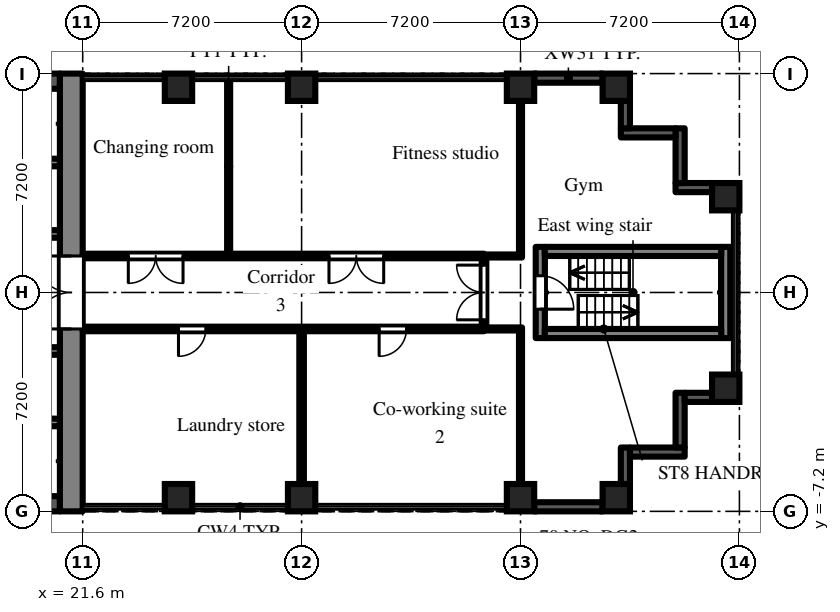
"""IFC4 building model, lengths in metres.
Left out: names, types, materials, properties, quantities, classifications, styles, units other than length and angle.
Written with IfcOpenShell. Run it as: python <this file> out.ifc"""

import sys

from ifc_helpers import new_model, si_unit, direction, frame, frame_2d, origin, origin_2d, place, context, subcontext, project, spatial, rectangle, extrude, element, fill, save


model = new_model("IFC4")
c1 = context("Model", 3, precision=1e-05, world=origin(), true_north=direction((0.0, 1.0)))
c2 = subcontext(c1, "Body", "Model", "MODEL_VIEW")
j1 = project(units=[si_unit("LENGTHUNIT", "METRE"), si_unit("PLANEANGLEUNIT", "RADIAN")], contexts=[c1])
p1 = place(None, origin())
s1 = spatial("IfcSite", under=j1, at=p1, CompositionType="ELEMENT")
p2 = place(p1, origin())
s2 = spatial("IfcBuilding", under=s1, at=p2, CompositionType="ELEMENT")
p3 = place(p2, frame((0.0, 0.0, 7.2)))
s3 = spatial("IfcBuildingStorey", under=s2, at=p3, CompositionType="ELEMENT", Elevation=7.2)
for number, where, z_axis, x_axis in (
    (1, (24.75, -6.75, 0.0), (0.0, 0.0, 1.0), (1.0, 0.0, 0.0)),
    (2, (24.75, 6.75, 0.0), (0.0, 0.0, 1.0), (1.0, 0.0, 0.0)),
    (3, (28.8, -6.75, 0.0), (0.0, 0.0, 1.0), (1.0, 0.0, 0.0)),
    (4, (28.8, 6.75, 0.0), (0.0, 0.0, 1.0), (1.0, 0.0, 0.0)),
    (5, (36.0, -6.75, 0.0), (0.0, 0.0, 1.0), (1.0, 0.0, 0.0)),
    (6, (36.0, 6.75, 0.0), (0.0, 0.0, 1.0), (1.0, 0.0, 0.0)),
    (7, (39.15, -6.75, 0.0), (0.0, 0.0, 1.0), (1.0, 0.0, 0.0)),
    (8, (39.15, 6.75, 0.0), (0.0, 0.0, 1.0), (1.0, 0.0, 0.0)),
    (9, (42.75, -3.15, 0.0), (0.0, 0.0, 1.0), (1.0, 0.0, 0.0)),
    (10, (42.75, 3.15, 0.0), (0.0, 0.0, 1.0), (1.0, 0.0, 0.0)),
):
    element("IfcColumn", number, at=place(p3, frame(where, z_axis=z_axis, x_axis=x_axis)), inside=s3, PredefinedType="COLUMN", context=c2, shape_type="SweptSolid", body=[
        extrude(rectangle(XDim=0.9, YDim=0.9, at=origin_2d()), origin(), (0.0, 0.0, 1.0), 4.5),
    ])
p4 = place(p3, frame((36.45, -7.05, 0.0), z_axis=(0.0, 0.0, 1.0), x_axis=(1.0, 0.0, 0.0)))
e11 = element("IfcWall", 11, at=p4, inside=s3, PredefinedType="SOLIDWALL", context=c2, shape_type="SweptSolid", body=[
    extrude(rectangle(XDim=2.25, YDim=0.3, at=frame_2d((1.125, 0.0))), origin(), (0.0, 0.0, 1.0), 3.6),
])
p5 = place(p3, frame((39.45, -6.3, 0.0), z_axis=(0.0, 0.0, 1.0), x_axis=(0.0, 1.0, 0.0)))
e12 = element("IfcWall", 12, at=p5, inside=s3, PredefinedType="SOLIDWALL", context=c2, shape_type="SweptSolid", body=[
    extrude(rectangle(XDim=1.2, YDim=0.3, at=frame_2d((0.6, 0.0))), origin(), (0.0, 0.0, 1.0), 4.075),
])
p6 = place(p3, frame((39.6, -5.25, 0.0), z_axis=(0.0, 0.0, 1.0), x_axis=(1.0, 0.0, 0.0)))
e13 = element("IfcWall", 13, at=p6, inside=s3, PredefinedType="SOLIDWALL", context=c2, shape_type="SweptSolid", body=[
    extrude(rectangle(XDim=1.8, YDim=0.3, at=frame_2d((0.9, 0.0))), origin(), (0.0, 0.0, 1.0), 4.075),
])
p7 = place(p3, frame((41.25, -5.1, 0.0), z_axis=(0.0, 0.0, 1.0), x_axis=(0.0, 1.0, 0.0)))
e14 = element("IfcWall", 14, at=p7, inside=s3, PredefinedType="SOLIDWALL", context=c2, shape_type="SweptSolid", body=[
    extrude(rectangle(XDim=1.8, YDim=0.3, at=frame_2d((0.9, 0.0))), origin(), (0.0, 0.0, 1.0), 4.075),
])
p8 = place(p3, frame((41.4, -3.45, 0.0), z_axis=(0.0, 0.0, 1.0), x_axis=(1.0, 0.0, 0.0)))
e15 = element("IfcWall", 15, at=p8, inside=s3, PredefinedType="SOLIDWALL", context=c2, shape_type="SweptSolid", body=[
    extrude(rectangle(XDim=0.9, YDim=0.3, at=frame_2d((0.45, 0.0))), origin(), (0.0, 0.0, 1.0), 4.075),
])
p9 = place(p3, frame((42.3, 3.45, 0.0), z_axis=(0.0, 0.0, 1.0), x_axis=(-1.0, 0.0, 0.0)))
e16 = element("IfcWall", 16, at=p9, inside=s3, PredefinedType="SOLIDWALL", context=c2, shape_type="SweptSolid", body=[
    extrude(rectangle(XDim=1.2, YDim=0.3, at=frame_2d((0.6, 0.0))), origin(), (0.0, 0.0, 1.0), 4.075),
])
p10 = place(p3, frame((41.25, 3.6, 0.0), z_axis=(0.0, 0.0, 1.0), x_axis=(0.0, 1.0, 0.0)))
e17 = element("IfcWall", 17, at=p10, inside=s3, PredefinedType="SOLIDWALL", context=c2, shape_type="SweptSolid", body=[
    extrude(rectangle(XDim=1.8, YDim=0.3, at=frame_2d((0.9, 0.0))), origin(), (0.0, 0.0, 1.0), 4.075),
])
p11 = place(p3, frame((41.1, 5.25, 0.0), z_axis=(0.0, 0.0, 1.0), x_axis=(-1.0, 0.0, 0.0)))
e18 = element("IfcWall", 18, at=p11, inside=s3, PredefinedType="SOLIDWALL", context=c2, shape_type="SweptSolid", body=[
    extrude(rectangle(XDim=1.8, YDim=0.3, at=frame_2d((0.9, 0.0))), origin(), (0.0, 0.0, 1.0), 4.075),
])
p12 = place(p3, frame((39.45, 5.4, 0.0), z_axis=(0.0, 0.0, 1.0), x_axis=(0.0, 1.0, 0.0)))
e19 = element("IfcWall", 19, at=p12, inside=s3, PredefinedType="SOLIDWALL", context=c2, shape_type="SweptSolid", body=[
    extrude(rectangle(XDim=0.9, YDim=0.3, at=frame_2d((0.45, 0.0))), origin(), (0.0, 0.0, 1.0), 4.075),
])
p13 = place(p3, frame((38.7, 7.05, 0.0), z_axis=(0.0, 0.0, 1.0), x_axis=(-1.0, 0.0, 0.0)))
e20 = element("IfcWall", 20, at=p13, inside=s3, PredefinedType="SOLIDWALL", context=c2, shape_type="SweptSolid", body=[
    extrude(rectangle(XDim=2.25, YDim=0.3, at=frame_2d((1.125, 0.0))), origin(), (0.0, 0.0, 1.0), 3.6),
])
p14 = place(p3, frame((21.225, -7.2, 0.0), z_axis=(0.0, 0.0, 1.0), x_axis=(0.0, 1.0, 0.0)))
e21 = element("IfcWall", 21, at=p14, inside=s3, PredefinedType="SHEAR", context=c2, shape_type="SweptSolid", body=[
    extrude(rectangle(XDim=14.4, YDim=0.75, at=frame_2d((7.2, 0.0))), origin(), (0.0, 0.0, 1.0), 4.075),
])
p15 = place(p14, frame((6.0, 0.0, 0.0)))
e22 = element("IfcOpeningElement", 22, at=p15, cuts=e21, PredefinedType="OPENING", context=c2, shape_type="SweptSolid", body=[
    extrude(rectangle(XDim=2.4, YDim=2.2, at=frame_2d((1.2, 1.1))), frame((0.0, 0.385, 0.0), z_axis=(0.0, -1.0, 0.0), x_axis=(1.0, 0.0, 0.0)), (0.0, 0.0, 1.0), 0.77),
])
p16 = place(p3, frame((7.9, 6.95, 0.0), z_axis=(0.0, 0.0, 1.0), x_axis=(1.0, 0.0, 0.0)))
e23 = element("IfcWall", 23, at=p16, inside=s3, PredefinedType="SHEAR", context=c2, shape_type="SweptSolid", body=[
    extrude(rectangle(XDim=12.95, YDim=0.5, at=frame_2d((6.475, 0.0))), origin(), (0.0, 0.0, 1.0), 4.075),
])
p17 = place(p3, frame((7.9, 1.925, 0.0), z_axis=(0.0, 0.0, 1.0), x_axis=(1.0, 0.0, 0.0)))
e24 = element("IfcWall", 24, at=p17, inside=s3, PredefinedType="SHEAR", context=c2, shape_type="SweptSolid", body=[
    extrude(rectangle(XDim=12.95, YDim=0.25, at=frame_2d((6.475, 0.0))), origin(), (0.0, 0.0, 1.0), 4.075),
])
p18 = place(p17, frame((0.525, 0.0, 0.0)))
e25 = element("IfcOpeningElement", 25, at=p18, cuts=e24, PredefinedType="OPENING", context=c2, shape_type="SweptSolid", body=[
    extrude(rectangle(XDim=0.9, YDim=2.1, at=frame_2d((0.45, 1.05))), frame((0.0, 0.135, 0.0), z_axis=(0.0, -1.0, 0.0), x_axis=(1.0, 0.0, 0.0)), (0.0, 0.0, 1.0), 0.27),
])
p19 = place(p17, frame((2.625, 0.0, 0.0)))
e26 = element("IfcOpeningElement", 26, at=p19, cuts=e24, PredefinedType="OPENING", context=c2, shape_type="SweptSolid", body=[
    extrude(rectangle(XDim=1.1, YDim=2.1, at=frame_2d((0.55, 1.05))), frame((0.0, 0.135, 0.0), z_axis=(0.0, -1.0, 0.0), x_axis=(1.0, 0.0, 0.0)), (0.0, 0.0, 1.0), 0.27),
])
p20 = place(p17, frame((4.925, 0.0, 0.0)))
e27 = element("IfcOpeningElement", 27, at=p20, cuts=e24, PredefinedType="OPENING", context=c2, shape_type="SweptSolid", body=[
    extrude(rectangle(XDim=0.9, YDim=2.1, at=frame_2d((0.45, 1.05))), frame((0.0, 0.135, 0.0), z_axis=(0.0, -1.0, 0.0), x_axis=(1.0, 0.0, 0.0)), (0.0, 0.0, 1.0), 0.27),
])
p21 = place(p17, frame((8.225, 0.0, 0.0)))
e28 = element("IfcOpeningElement", 28, at=p21, cuts=e24, PredefinedType="OPENING", context=c2, shape_type="SweptSolid", body=[
    extrude(rectangle(XDim=0.9, YDim=2.1, at=frame_2d((0.45, 1.05))), frame((0.0, 0.135, 0.0), z_axis=(0.0, -1.0, 0.0), x_axis=(1.0, 0.0, 0.0)), (0.0, 0.0, 1.0), 0.27),
])
p22 = place(p3, frame((12.3, 4.275, 0.0), z_axis=(0.0, 0.0, 1.0), x_axis=(1.0, 0.0, 0.0)))
e29 = element("IfcWall", 29, at=p22, inside=s3, PredefinedType="SHEAR", context=c2, shape_type="SweptSolid", body=[
    extrude(rectangle(XDim=8.55, YDim=0.25, at=frame_2d((4.275, 0.0))), origin(), (0.0, 0.0, 1.0), 4.075),
])
p23 = place(p3, frame((7.9, -6.95, 0.0), z_axis=(0.0, 0.0, 1.0), x_axis=(1.0, 0.0, 0.0)))
e30 = element("IfcWall", 30, at=p23, inside=s3, PredefinedType="SHEAR", context=c2, shape_type="SweptSolid", body=[
    extrude(rectangle(XDim=12.95, YDim=0.5, at=frame_2d((6.475, 0.0))), origin(), (0.0, 0.0, 1.0), 4.075),
])
p24 = place(p3, frame((7.9, -1.925, 0.0), z_axis=(0.0, 0.0, 1.0), x_axis=(1.0, 0.0, 0.0)))
e31 = element("IfcWall", 31, at=p24, inside=s3, PredefinedType="SHEAR", context=c2, shape_type="SweptSolid", body=[
    extrude(rectangle(XDim=12.95, YDim=0.25, at=frame_2d((6.475, 0.0))), origin(), (0.0, 0.0, 1.0), 4.075),
])
p25 = place(p24, frame((4.825, 0.0, 0.0)))
e32 = element("IfcOpeningElement", 32, at=p25, cuts=e31, PredefinedType="OPENING", context=c2, shape_type="SweptSolid", body=[
    extrude(rectangle(XDim=1.1, YDim=2.1, at=frame_2d((0.55, 1.05))), frame((0.0, 0.135, 0.0), z_axis=(0.0, -1.0, 0.0), x_axis=(1.0, 0.0, 0.0)), (0.0, 0.0, 1.0), 0.27),
])
p26 = place(p24, frame((7.025, 0.0, 0.0)))
e33 = element("IfcOpeningElement", 33, at=p26, cuts=e31, PredefinedType="OPENING", context=c2, shape_type="SweptSolid", body=[
    extrude(rectangle(XDim=1.1, YDim=2.1, at=frame_2d((0.55, 1.05))), frame((0.0, 0.135, 0.0), z_axis=(0.0, -1.0, 0.0), x_axis=(1.0, 0.0, 0.0)), (0.0, 0.0, 1.0), 0.27),
])
p27 = place(p24, frame((9.225, 0.0, 0.0)))
e34 = element("IfcOpeningElement", 34, at=p27, cuts=e31, PredefinedType="OPENING", context=c2, shape_type="SweptSolid", body=[
    extrude(rectangle(XDim=1.1, YDim=2.1, at=frame_2d((0.55, 1.05))), frame((0.0, 0.135, 0.0), z_axis=(0.0, -1.0, 0.0), x_axis=(1.0, 0.0, 0.0)), (0.0, 0.0, 1.0), 0.27),
])
p28 = place(p24, frame((0.525, 0.0, 0.0)))
e35 = element("IfcOpeningElement", 35, at=p28, cuts=e31, PredefinedType="OPENING", context=c2, shape_type="SweptSolid", body=[
    extrude(rectangle(XDim=0.9, YDim=2.1, at=frame_2d((0.45, 1.05))), frame((0.0, 0.135, 0.0), z_axis=(0.0, -1.0, 0.0), x_axis=(1.0, 0.0, 0.0)), (0.0, 0.0, 1.0), 0.27),
])
p29 = place(p24, frame((2.625, 0.0, 0.0)))
e36 = element("IfcOpeningElement", 36, at=p29, cuts=e31, PredefinedType="OPENING", context=c2, shape_type="SweptSolid", body=[
    extrude(rectangle(XDim=1.1, YDim=2.1, at=frame_2d((0.55, 1.05))), frame((0.0, 0.135, 0.0), z_axis=(0.0, -1.0, 0.0), x_axis=(1.0, 0.0, 0.0)), (0.0, 0.0, 1.0), 0.27),
])
p30 = place(p3, frame((12.3, -4.275, 0.0), z_axis=(0.0, 0.0, 1.0), x_axis=(1.0, 0.0, 0.0)))
e37 = element("IfcWall", 37, at=p30, inside=s3, PredefinedType="SHEAR", context=c2, shape_type="SweptSolid", body=[
    extrude(rectangle(XDim=8.55, YDim=0.25, at=frame_2d((4.275, 0.0))), origin(), (0.0, 0.0, 1.0), 4.075),
])
p31 = place(p3, frame((36.65, -1.5, 0.0), z_axis=(0.0, 0.0, 1.0), x_axis=(0.0, 1.0, 0.0)))
e38 = element("IfcWall", 38, at=p31, inside=s3, PredefinedType="SHEAR", context=c2, shape_type="SweptSolid", body=[
    extrude(rectangle(XDim=3.0, YDim=0.3, at=frame_2d((1.5, 0.0))), origin(), (0.0, 0.0, 1.0), 4.075),
])
p32 = place(p31, frame((0.95, 0.0, 0.0)))
e39 = element("IfcOpeningElement", 39, at=p32, cuts=e38, PredefinedType="OPENING", context=c2, shape_type="SweptSolid", body=[
    extrude(rectangle(XDim=1.1, YDim=2.1, at=frame_2d((0.55, 1.05))), frame((0.0, 0.16, 0.0), z_axis=(0.0, -1.0, 0.0), x_axis=(1.0, 0.0, 0.0)), (0.0, 0.0, 1.0), 0.32),
])
p33 = place(p3, frame((42.75, -1.5, 0.0), z_axis=(0.0, 0.0, 1.0), x_axis=(0.0, 1.0, 0.0)))
e40 = element("IfcWall", 40, at=p33, inside=s3, PredefinedType="SHEAR", context=c2, shape_type="SweptSolid", body=[
    extrude(rectangle(XDim=3.0, YDim=0.3, at=frame_2d((1.5, 0.0))), origin(), (0.0, 0.0, 1.0), 4.075),
])
for number, where, z_axis, x_axis in (
    (41, (36.8, -1.35, 0.0), (0.0, 0.0, 1.0), (1.0, 0.0, 0.0)),
    (42, (36.8, 1.35, 0.0), (0.0, 0.0, 1.0), (1.0, 0.0, 0.0)),
):
    element("IfcWall", number, at=place(p3, frame(where, z_axis=z_axis, x_axis=x_axis)), inside=s3, PredefinedType="SHEAR", context=c2, shape_type="SweptSolid", body=[
        extrude(rectangle(XDim=5.8, YDim=0.3, at=frame_2d((2.9, 0.0))), origin(), (0.0, 0.0, 1.0), 4.075),
    ])
p34 = place(p3, frame((21.6, -1.2, 0.0), z_axis=(0.0, 0.0, 1.0), x_axis=(1.0, 0.0, 0.0)))
e43 = element("IfcWall", 43, at=p34, inside=s3, PredefinedType="PARTITIONING", context=c2, shape_type="SweptSolid", body=[
    extrude(rectangle(XDim=13.2, YDim=0.15, at=frame_2d((6.6, 0.0))), origin(), (0.0, 0.0, 1.0), 4.075),
])
p35 = place(p34, frame((3.15, 0.0, 0.0)))
e44 = element("IfcOpeningElement", 44, at=p35, cuts=e43, PredefinedType="OPENING", context=c2, shape_type="SweptSolid", body=[
    extrude(rectangle(XDim=0.9, YDim=2.1, at=frame_2d((0.45, 1.05))), frame((0.0, 0.085, 0.0), z_axis=(0.0, -1.0, 0.0), x_axis=(1.0, 0.0, 0.0)), (0.0, 0.0, 1.0), 0.17),
])
p36 = place(p34, frame((9.75, 0.0, 0.0)))
e45 = element("IfcOpeningElement", 45, at=p36, cuts=e43, PredefinedType="OPENING", context=c2, shape_type="SweptSolid", body=[
    extrude(rectangle(XDim=0.9, YDim=2.1, at=frame_2d((0.45, 1.05))), frame((0.0, 0.085, 0.0), z_axis=(0.0, -1.0, 0.0), x_axis=(1.0, 0.0, 0.0)), (0.0, 0.0, 1.0), 0.17),
])
p37 = place(p3, frame((21.6, 1.2, 0.0), z_axis=(0.0, 0.0, 1.0), x_axis=(1.0, 0.0, 0.0)))
e46 = element("IfcWall", 46, at=p37, inside=s3, PredefinedType="PARTITIONING", context=c2, shape_type="SweptSolid", body=[
    extrude(rectangle(XDim=13.2, YDim=0.15, at=frame_2d((6.6, 0.0))), origin(), (0.0, 0.0, 1.0), 4.075),
])
p38 = place(p37, frame((1.5, 0.0, 0.0)))
e47 = element("IfcOpeningElement", 47, at=p38, cuts=e46, PredefinedType="OPENING", context=c2, shape_type="SweptSolid", body=[
    extrude(rectangle(XDim=1.8, YDim=2.1, at=frame_2d((0.9, 1.05))), frame((0.0, 0.085, 0.0), z_axis=(0.0, -1.0, 0.0), x_axis=(1.0, 0.0, 0.0)), (0.0, 0.0, 1.0), 0.17),
])
p39 = place(p37, frame((8.1, 0.0, 0.0)))
e48 = element("IfcOpeningElement", 48, at=p39, cuts=e46, PredefinedType="OPENING", context=c2, shape_type="SweptSolid", body=[
    extrude(rectangle(XDim=1.8, YDim=2.1, at=frame_2d((0.9, 1.05))), frame((0.0, 0.085, 0.0), z_axis=(0.0, -1.0, 0.0), x_axis=(1.0, 0.0, 0.0)), (0.0, 0.0, 1.0), 0.17),
])
p40 = place(p3, frame((26.4, 1.275, 0.0), z_axis=(0.0, 0.0, 1.0), x_axis=(0.0, 1.0, 0.0)))
e49 = element("IfcWall", 49, at=p40, inside=s3, PredefinedType="PARTITIONING", context=c2, shape_type="SweptSolid", body=[
    extrude(rectangle(XDim=5.745, YDim=0.1, at=frame_2d((2.873, 0.0))), origin(), (0.0, 0.0, 1.0), 4.075),
])
p41 = place(p3, frame((28.8, -6.9, 0.0), z_axis=(0.0, 0.0, 1.0), x_axis=(0.0, 1.0, 0.0)))
e50 = element("IfcWall", 50, at=p41, inside=s3, PredefinedType="PARTITIONING", context=c2, shape_type="SweptSolid", body=[
    extrude(rectangle(XDim=5.625, YDim=0.15, at=frame_2d((2.812, 0.0))), origin(), (0.0, 0.0, 1.0), 4.075),
])
p42 = place(p3, frame((34.8, -1.125, 0.0), z_axis=(0.0, 0.0, 1.0), x_axis=(0.0, 1.0, 0.0)))
e51 = element("IfcWall", 51, at=p42, inside=s3, PredefinedType="PARTITIONING", context=c2, shape_type="SweptSolid", body=[
    extrude(rectangle(XDim=2.25, YDim=0.15, at=frame_2d((1.125, 0.0))), origin(), (0.0, 0.0, 1.0), 4.075),
])
p43 = place(p42, frame((0.225, 0.0, 0.0)))
e52 = element("IfcOpeningElement", 52, at=p43, cuts=e51, PredefinedType="OPENING", context=c2, shape_type="SweptSolid", body=[
    extrude(rectangle(XDim=1.8, YDim=2.1, at=frame_2d((0.9, 1.05))), frame((0.0, 0.085, 0.0), z_axis=(0.0, -1.0, 0.0), x_axis=(1.0, 0.0, 0.0)), (0.0, 0.0, 1.0), 0.17),
])
for number, where, z_axis, x_axis in (
    (53, (34.8, -1.2, 0.0), (0.0, 0.0, 1.0), (1.0, 0.0, 0.0)),
    (54, (34.8, 1.2, 0.0), (0.0, 0.0, 1.0), (1.0, 0.0, 0.0)),
):
    element("IfcWall", number, at=place(p3, frame(where, z_axis=z_axis, x_axis=x_axis)), inside=s3, PredefinedType="PARTITIONING", context=c2, shape_type="SweptSolid", body=[
        extrude(rectangle(XDim=1.25, YDim=0.1, at=frame_2d((0.625, 0.0))), origin(), (0.0, 0.0, 1.0), 4.075),
    ])
for number, where, z_axis, x_axis in (
    (55, (36.0, -6.9, 0.0), (0.0, 0.0, 1.0), (0.0, 1.0, 0.0)),
    (56, (36.0, 1.25, 0.0), (0.0, 0.0, 1.0), (0.0, 1.0, 0.0)),
):
    element("IfcWall", number, at=place(p3, frame(where, z_axis=z_axis, x_axis=x_axis)), inside=s3, PredefinedType="PARTITIONING", context=c2, shape_type="SweptSolid", body=[
        extrude(rectangle(XDim=5.65, YDim=0.1, at=frame_2d((2.825, 0.0))), origin(), (0.0, 0.0, 1.0), 4.075),
    ])
p44 = place(p15, origin())
e57 = element("IfcDoor", 57, at=p44, inside=s3, OperationType="DOUBLE_DOOR_DOUBLE_SWING", PredefinedType="DOOR", context=c2, shape_type="SweptSolid", body=[
    extrude(rectangle(XDim=2.4, YDim=2.2, at=frame_2d((1.2, 1.1))), frame((0.0, 0.025, 0.0), z_axis=(0.0, -1.0, 0.0), x_axis=(1.0, 0.0, 0.0)), (0.0, 0.0, 1.0), 0.05),
])
fill(e22, e57)
p45 = place(p32, frame((1.1, 0.0, 0.0), z_axis=(0.0, 0.0, 1.0), x_axis=(-1.0, 0.0, 0.0)))
e58 = element("IfcDoor", 58, at=p45, inside=s3, OperationType="SINGLE_SWING_RIGHT", PredefinedType="DOOR", context=c2, shape_type="SweptSolid", body=[
    extrude(rectangle(XDim=1.1, YDim=2.1, at=frame_2d((0.55, 1.05))), frame((0.0, 0.025, 0.0), z_axis=(0.0, -1.0, 0.0), x_axis=(1.0, 0.0, 0.0)), (0.0, 0.0, 1.0), 0.05),
])
fill(e39, e58)
p46 = place(p43, origin())
e59 = element("IfcDoor", 59, at=p46, inside=s3, OperationType="DOUBLE_DOOR_DOUBLE_SWING", PredefinedType="DOOR", context=c2, shape_type="SweptSolid", body=[
    extrude(rectangle(XDim=1.8, YDim=2.1, at=frame_2d((0.9, 1.05))), frame((0.0, 0.025, 0.0), z_axis=(0.0, -1.0, 0.0), x_axis=(1.0, 0.0, 0.0)), (0.0, 0.0, 1.0), 0.05),
])
fill(e52, e59)
p47 = place(p38, frame((1.8, 0.0, 0.0), z_axis=(0.0, 0.0, 1.0), x_axis=(-1.0, 0.0, 0.0)))
e60 = element("IfcDoor", 60, at=p47, inside=s3, OperationType="DOUBLE_DOOR_DOUBLE_SWING", PredefinedType="DOOR", context=c2, shape_type="SweptSolid", body=[
    extrude(rectangle(XDim=1.8, YDim=2.1, at=frame_2d((0.9, 1.05))), frame((0.0, 0.025, 0.0), z_axis=(0.0, -1.0, 0.0), x_axis=(1.0, 0.0, 0.0)), (0.0, 0.0, 1.0), 0.05),
])
fill(e47, e60)
p48 = place(p39, frame((1.8, 0.0, 0.0), z_axis=(0.0, 0.0, 1.0), x_axis=(-1.0, 0.0, 0.0)))
e61 = element("IfcDoor", 61, at=p48, inside=s3, OperationType="DOUBLE_DOOR_DOUBLE_SWING", PredefinedType="DOOR", context=c2, shape_type="SweptSolid", body=[
    extrude(rectangle(XDim=1.8, YDim=2.1, at=frame_2d((0.9, 1.05))), frame((0.0, 0.025, 0.0), z_axis=(0.0, -1.0, 0.0), x_axis=(1.0, 0.0, 0.0)), (0.0, 0.0, 1.0), 0.05),
])
fill(e48, e61)
p49 = place(p35, frame((0.9, 0.0, 0.0), z_axis=(0.0, 0.0, 1.0), x_axis=(-1.0, 0.0, 0.0)))
e62 = element("IfcDoor", 62, at=p49, inside=s3, OperationType="SINGLE_SWING_RIGHT", PredefinedType="DOOR", context=c2, shape_type="SweptSolid", body=[
    extrude(rectangle(XDim=0.9, YDim=2.1, at=frame_2d((0.45, 1.05))), frame((0.0, 0.025, 0.0), z_axis=(0.0, -1.0, 0.0), x_axis=(1.0, 0.0, 0.0)), (0.0, 0.0, 1.0), 0.05),
])
fill(e44, e62)
p50 = place(p36, frame((0.9, 0.0, 0.0), z_axis=(0.0, 0.0, 1.0), x_axis=(-1.0, 0.0, 0.0)))
e63 = element("IfcDoor", 63, at=p50, inside=s3, OperationType="SINGLE_SWING_RIGHT", PredefinedType="DOOR", context=c2, shape_type="SweptSolid", body=[
    extrude(rectangle(XDim=0.9, YDim=2.1, at=frame_2d((0.45, 1.05))), frame((0.0, 0.025, 0.0), z_axis=(0.0, -1.0, 0.0), x_axis=(1.0, 0.0, 0.0)), (0.0, 0.0, 1.0), 0.05),
])
fill(e45, e63)
save(model, sys.argv[1])
